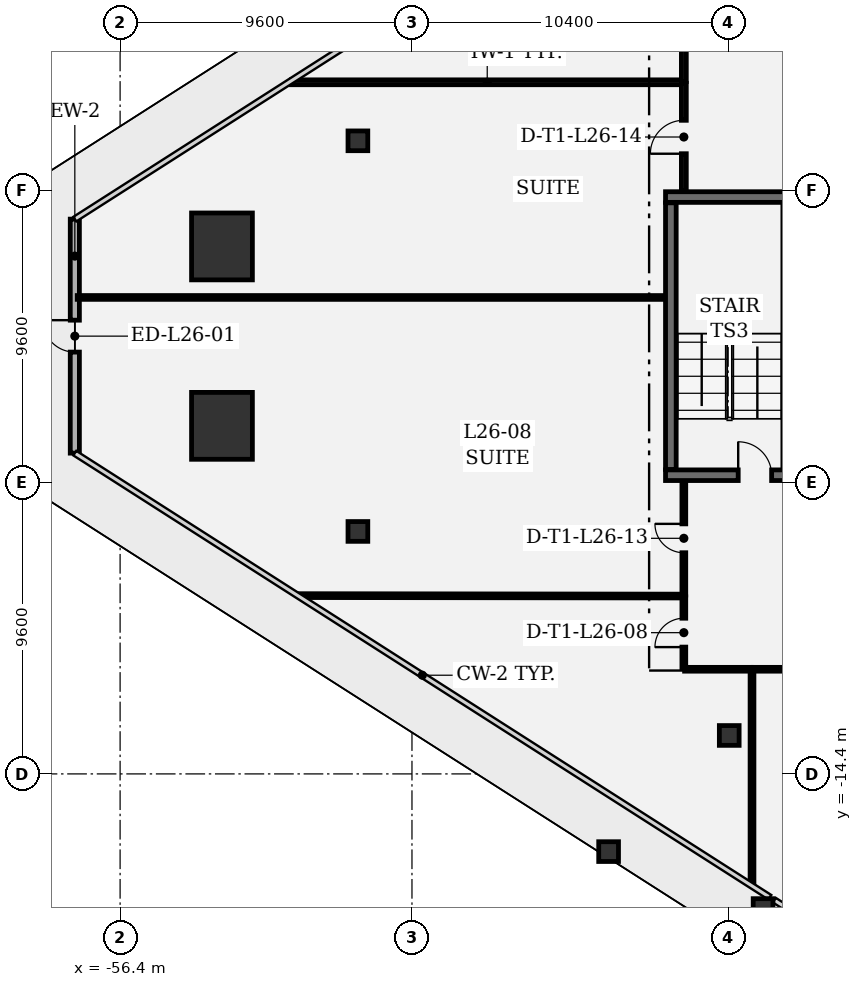
"""IFC4 building model, lengths in metres.
Left out: names, types, materials, properties, quantities, classifications, styles, units other than length and angle.
Written with IfcOpenShell. Run it as: python <this file> out.ifc"""

import sys

from ifc_helpers import new_model, si_unit, direction, frame, frame_2d, origin, origin_2d, place, context, subcontext, project, spatial, rectangle, extrude, element, fill, save


model = new_model("IFC4")
c1 = context("Model", 3, precision=1e-05, world=origin(), true_north=direction((0.0, 1.0)))
c2 = subcontext(c1, "Body", "Model", "MODEL_VIEW")
j1 = project(units=[si_unit("LENGTHUNIT", "METRE"), si_unit("PLANEANGLEUNIT", "RADIAN")], contexts=[c1])
p1 = place(None, origin())
s1 = spatial("IfcSite", under=j1, at=p1, CompositionType="ELEMENT")
p2 = place(p1, origin())
s2 = spatial("IfcBuilding", under=s1, at=p2, CompositionType="ELEMENT")
p3 = place(p2, frame((0.0, 0.0, 117.9)))
s3 = spatial("IfcBuildingStorey", under=s2, at=p3, CompositionType="ELEMENT", Elevation=117.9)
for number, where, z_axis, x_axis in (
    (1, (-53.049, 2.951, 0.0), (0.0, 0.0, 1.0), (1.0, 0.0, 0.0)),
    (2, (-53.049, -2.951, 0.0), (0.0, 0.0, 1.0), (1.0, 0.0, 0.0)),
):
    element("IfcColumn", number, at=place(p3, frame(where, z_axis=z_axis, x_axis=x_axis)), inside=s3, PredefinedType="COLUMN", context=c2, shape_type="SweptSolid", body=[
        extrude(rectangle(XDim=2.0, YDim=2.2, at=origin_2d()), origin(), (0.0, 0.0, 1.0), 4.05),
    ])
for number, where, z_axis, x_axis in (
    (3, (-40.333, -16.956, 0.0), (0.0, 0.0, 1.0), (1.0, 0.0, 0.0)),
    (4, (-35.252, -18.829, 0.0), (0.0, 0.0, 1.0), (1.0, 0.0, 0.0)),
    (5, (-48.578, 6.425, 0.0), (0.0, 0.0, 1.0), (1.0, 0.0, 0.0)),
    (6, (-48.578, -6.425, 0.0), (0.0, 0.0, 1.0), (1.0, 0.0, 0.0)),
    (7, (-36.365, -13.135, 0.0), (0.0, 0.0, 1.0), (1.0, 0.0, 0.0)),
):
    element("IfcColumn", number, at=place(p3, frame(where, z_axis=z_axis, x_axis=x_axis)), inside=s3, PredefinedType="COLUMN", context=c2, shape_type="SweptSolid", body=[
        extrude(rectangle(XDim=0.65, YDim=0.65, at=origin_2d()), origin(), (0.0, 0.0, 1.0), 4.05),
    ])
p4 = place(p3, frame((-57.889, -3.849, 0.0), z_axis=(0.0, 0.0, 1.0), x_axis=(0.0, 1.0, 0.0)))
e8 = element("IfcWall", 8, at=p4, inside=s3, PredefinedType="SOLIDWALL", context=c2, shape_type="SweptSolid", body=[
    extrude(rectangle(XDim=7.697, YDim=0.3, at=frame_2d((3.849, 0.0))), origin(), (0.0, 0.0, 1.0), 3.77),
])
p5 = place(p4, frame((3.323, 0.0, 0.0)))
e9 = element("IfcOpeningElement", 9, at=p5, cuts=e8, PredefinedType="OPENING", context=c2, shape_type="SweptSolid", body=[
    extrude(rectangle(XDim=1.05, YDim=2.2, at=frame_2d((0.525, 1.1))), frame((0.0, 0.16, 0.0), z_axis=(0.0, -1.0, 0.0), x_axis=(1.0, 0.0, 0.0)), (0.0, 0.0, 1.0), 0.32),
])
p6 = place(p3, frame((-38.46, -4.575, 0.0), z_axis=(0.0, 0.0, 1.0), x_axis=(1.0, 0.0, 0.0)))
e10 = element("IfcWall", 10, at=p6, inside=s3, PredefinedType="SHEAR", context=c2, shape_type="SweptSolid", body=[
    extrude(rectangle(XDim=4.21, YDim=0.35, at=frame_2d((2.105, 0.0))), origin(), (0.0, 0.0, 1.0), 3.77),
])
p7 = place(p6, frame((2.39, 0.0, 0.0)))
e11 = element("IfcOpeningElement", 11, at=p7, cuts=e10, PredefinedType="OPENING", context=c2, shape_type="SweptSolid", body=[
    extrude(rectangle(XDim=1.1, YDim=2.2, at=frame_2d((0.55, 1.1))), frame((0.0, 0.185, 0.0), z_axis=(0.0, -1.0, 0.0), x_axis=(1.0, 0.0, 0.0)), (0.0, 0.0, 1.0), 0.37),
])
p8 = place(p3, frame((-34.25, 4.575, 0.0), z_axis=(0.0, 0.0, 1.0), x_axis=(-1.0, 0.0, 0.0)))
e12 = element("IfcWall", 12, at=p8, inside=s3, PredefinedType="SHEAR", context=c2, shape_type="SweptSolid", body=[
    extrude(rectangle(XDim=4.21, YDim=0.35, at=frame_2d((2.105, 0.0))), origin(), (0.0, 0.0, 1.0), 3.77),
])
p9 = place(p3, frame((-38.285, 4.385, 0.0), z_axis=(0.0, 0.0, 1.0), x_axis=(0.0, -1.0, 0.0)))
e13 = element("IfcWall", 13, at=p9, inside=s3, PredefinedType="SHEAR", context=c2, shape_type="SweptSolid", body=[
    extrude(rectangle(XDim=8.77, YDim=0.35, at=frame_2d((4.385, 0.0))), origin(), (0.0, 0.0, 1.0), 3.77),
])
p10 = place(p3, frame((-50.766, 8.35, 0.0), z_axis=(0.0, 0.0, 1.0), x_axis=(1.0, 0.0, 0.0)))
e14 = element("IfcWall", 14, at=p10, inside=s3, PredefinedType="PARTITIONING", context=c2, shape_type="SweptSolid", body=[
    extrude(rectangle(XDim=12.883, YDim=0.16, at=frame_2d((6.442, 0.0))), origin(), (0.0, 0.0, 1.0), 2.89),
])
p11 = place(p3, frame((-37.858, 10.733, 0.0), z_axis=(0.0, 0.0, 1.0), x_axis=(0.0, -1.0, 0.0)))
e15 = element("IfcWall", 15, at=p11, inside=s3, PredefinedType="PARTITIONING", context=c2, shape_type="SweptSolid", body=[
    extrude(rectangle(XDim=2.358, YDim=0.16, at=frame_2d((1.179, 0.0))), origin(), (0.0, 0.0, 1.0), 3.77),
])
p12 = place(p3, frame((-35.64, -10.958, 0.0), z_axis=(0.0, 0.0, 1.0), x_axis=(-1.0, 0.0, 0.0)))
e16 = element("IfcWall", 16, at=p12, inside=s3, PredefinedType="PARTITIONING", context=c2, shape_type="SweptSolid", body=[
    extrude(rectangle(XDim=2.193, YDim=0.125, at=frame_2d((1.096, 0.0))), origin(), (0.0, 0.0, 1.0), 3.334),
])
p13 = place(p3, frame((-37.858, -10.933, 0.0), z_axis=(0.0, 0.0, 1.0), x_axis=(0.0, 1.0, 0.0)))
e17 = element("IfcWall", 17, at=p13, inside=s3, PredefinedType="PARTITIONING", context=c2, shape_type="SweptSolid", body=[
    extrude(rectangle(XDim=2.358, YDim=0.125, at=frame_2d((1.179, 0.0))), origin(), (0.0, 0.0, 1.0), 3.77),
])
p14 = place(p13, frame((0.704, 0.0, 0.0)))
e18 = element("IfcOpeningElement", 18, at=p14, cuts=e17, PredefinedType="OPENING", context=c2, shape_type="SweptSolid", body=[
    extrude(rectangle(XDim=0.95, YDim=2.15, at=frame_2d((0.475, 1.075))), frame((0.0, 0.073, 0.0), z_axis=(0.0, -1.0, 0.0), x_axis=(1.0, 0.0, 0.0)), (0.0, 0.0, 1.0), 0.145),
])
p15 = place(p3, frame((-37.883, -8.55, 0.0), z_axis=(0.0, 0.0, 1.0), x_axis=(-0.999999323514, 0.001163173127, 0.0)))
e19 = element("IfcWall", 19, at=p15, inside=s3, PredefinedType="PARTITIONING", context=c2, shape_type="SweptSolid", body=[
    extrude(rectangle(XDim=12.594, YDim=0.125, at=frame_2d((6.297, 0.0))), origin(), (0.0, 0.0, 1.0), 2.89),
])
p16 = place(p3, frame((-35.615, -18.004, 0.0), z_axis=(0.0, 0.0, 1.0), x_axis=(0.0, 1.0, 0.0)))
e20 = element("IfcWall", 20, at=p16, inside=s3, PredefinedType="PARTITIONING", context=c2, shape_type="SweptSolid", body=[
    extrude(rectangle(XDim=7.021, YDim=0.125, at=frame_2d((3.511, 0.0))), origin(), (0.0, 0.0, 1.0), 3.77),
])
p17 = place(p3, frame((-27.904, -10.958, 0.0), z_axis=(0.0, 0.0, 1.0), x_axis=(-1.0, 0.0, 0.0)))
e21 = element("IfcWall", 21, at=p17, inside=s3, PredefinedType="PARTITIONING", context=c2, shape_type="SweptSolid", body=[
    extrude(rectangle(XDim=7.679, YDim=0.125, at=frame_2d((3.839, 0.0))), origin(), (0.0, 0.0, 1.0), 3.334),
])
p18 = place(p17, frame((3.365, 0.0, 0.0)))
e22 = element("IfcOpeningElement", 22, at=p18, cuts=e21, PredefinedType="OPENING", context=c2, shape_type="SweptSolid", body=[
    extrude(rectangle(XDim=0.95, YDim=2.15, at=frame_2d((0.475, 1.075))), frame((0.0, 0.073, 0.0), z_axis=(0.0, -1.0, 0.0), x_axis=(1.0, 0.0, 0.0)), (0.0, 0.0, 1.0), 0.145),
])
p19 = place(p3, frame((-37.858, -8.517, 0.0), z_axis=(0.0, 0.0, 1.0), x_axis=(0.0, 1.0, 0.0)))
e23 = element("IfcWall", 23, at=p19, inside=s3, PredefinedType="PARTITIONING", context=c2, shape_type="SweptSolid", body=[
    extrude(rectangle(XDim=3.734, YDim=0.125, at=frame_2d((1.867, 0.0))), origin(), (0.0, 0.0, 1.0), 3.77),
])
p20 = place(p19, frame((1.392, 0.0, 0.0)))
e24 = element("IfcOpeningElement", 24, at=p20, cuts=e23, PredefinedType="OPENING", context=c2, shape_type="SweptSolid", body=[
    extrude(rectangle(XDim=0.95, YDim=2.15, at=frame_2d((0.475, 1.075))), frame((0.0, 0.073, 0.0), z_axis=(0.0, -1.0, 0.0), x_axis=(1.0, 0.0, 0.0)), (0.0, 0.0, 1.0), 0.145),
])
p21 = place(p3, frame((-38.493, 1.271, 0.0), z_axis=(0.0, 0.0, 1.0), x_axis=(-0.999999998722, 5.0556756e-05, 0.0)))
e25 = element("IfcWall", 25, at=p21, inside=s3, PredefinedType="PARTITIONING", context=c2, shape_type="SweptSolid", body=[
    extrude(rectangle(XDim=19.316, YDim=0.125, at=frame_2d((9.658, 0.0))), origin(), (0.0, 0.0, 1.0), 3.77),
])
p22 = place(p3, frame((-37.858, 4.783, 0.0), z_axis=(0.0, 0.0, 1.0), x_axis=(0.0, 1.0, 0.0)))
e26 = element("IfcWall", 26, at=p22, inside=s3, PredefinedType="PARTITIONING", context=c2, shape_type="SweptSolid", body=[
    extrude(rectangle(XDim=3.534, YDim=0.16, at=frame_2d((1.767, 0.0))), origin(), (0.0, 0.0, 1.0), 3.77),
])
p23 = place(p22, frame((1.217, 0.0, 0.0)))
e27 = element("IfcOpeningElement", 27, at=p23, cuts=e26, PredefinedType="OPENING", context=c2, shape_type="SweptSolid", body=[
    extrude(rectangle(XDim=1.1, YDim=2.15, at=frame_2d((0.55, 1.075))), frame((0.0, 0.09, 0.0), z_axis=(0.0, -1.0, 0.0), x_axis=(1.0, 0.0, 0.0)), (0.0, 0.0, 1.0), 0.18),
])
p24 = place(p5, origin())
e28 = element("IfcDoor", 28, at=p24, inside=s3, OperationType="SINGLE_SWING_RIGHT", PredefinedType="DOOR", context=c2, shape_type="SweptSolid", body=[
    extrude(rectangle(XDim=1.05, YDim=2.2, at=frame_2d((0.525, 1.1))), frame((0.0, 0.025, 0.0), z_axis=(0.0, -1.0, 0.0), x_axis=(1.0, 0.0, 0.0)), (0.0, 0.0, 1.0), 0.05),
])
fill(e9, e28)
p25 = place(p7, origin())
e29 = element("IfcDoor", 29, at=p25, inside=s3, OperationType="SINGLE_SWING_LEFT", PredefinedType="DOOR", context=c2, shape_type="SweptSolid", body=[
    extrude(rectangle(XDim=1.1, YDim=2.2, at=frame_2d((0.55, 1.1))), frame((0.0, 0.025, 0.0), z_axis=(0.0, -1.0, 0.0), x_axis=(1.0, 0.0, 0.0)), (0.0, 0.0, 1.0), 0.05),
])
fill(e11, e29)
p26 = place(p14, origin())
e30 = element("IfcDoor", 30, at=p26, inside=s3, OperationType="SINGLE_SWING_LEFT", PredefinedType="DOOR", context=c2, shape_type="SweptSolid", body=[
    extrude(rectangle(XDim=0.95, YDim=2.15, at=frame_2d((0.475, 1.075))), frame((0.0, 0.025, 0.0), z_axis=(0.0, -1.0, 0.0), x_axis=(1.0, 0.0, 0.0)), (0.0, 0.0, 1.0), 0.05),
])
fill(e18, e30)
p27 = place(p20, origin())
e31 = element("IfcDoor", 31, at=p27, inside=s3, OperationType="SINGLE_SWING_RIGHT", PredefinedType="DOOR", context=c2, shape_type="SweptSolid", body=[
    extrude(rectangle(XDim=0.95, YDim=2.15, at=frame_2d((0.475, 1.075))), frame((0.0, 0.025, 0.0), z_axis=(0.0, -1.0, 0.0), x_axis=(1.0, 0.0, 0.0)), (0.0, 0.0, 1.0), 0.05),
])
fill(e24, e31)
p28 = place(p23, origin())
e32 = element("IfcDoor", 32, at=p28, inside=s3, OperationType="SINGLE_SWING_LEFT", PredefinedType="DOOR", context=c2, shape_type="SweptSolid", body=[
    extrude(rectangle(XDim=1.1, YDim=2.15, at=frame_2d((0.55, 1.075))), frame((0.0, 0.025, 0.0), z_axis=(0.0, -1.0, 0.0), x_axis=(1.0, 0.0, 0.0)), (0.0, 0.0, 1.0), 0.05),
])
fill(e27, e32)
save(model, sys.argv[1])
